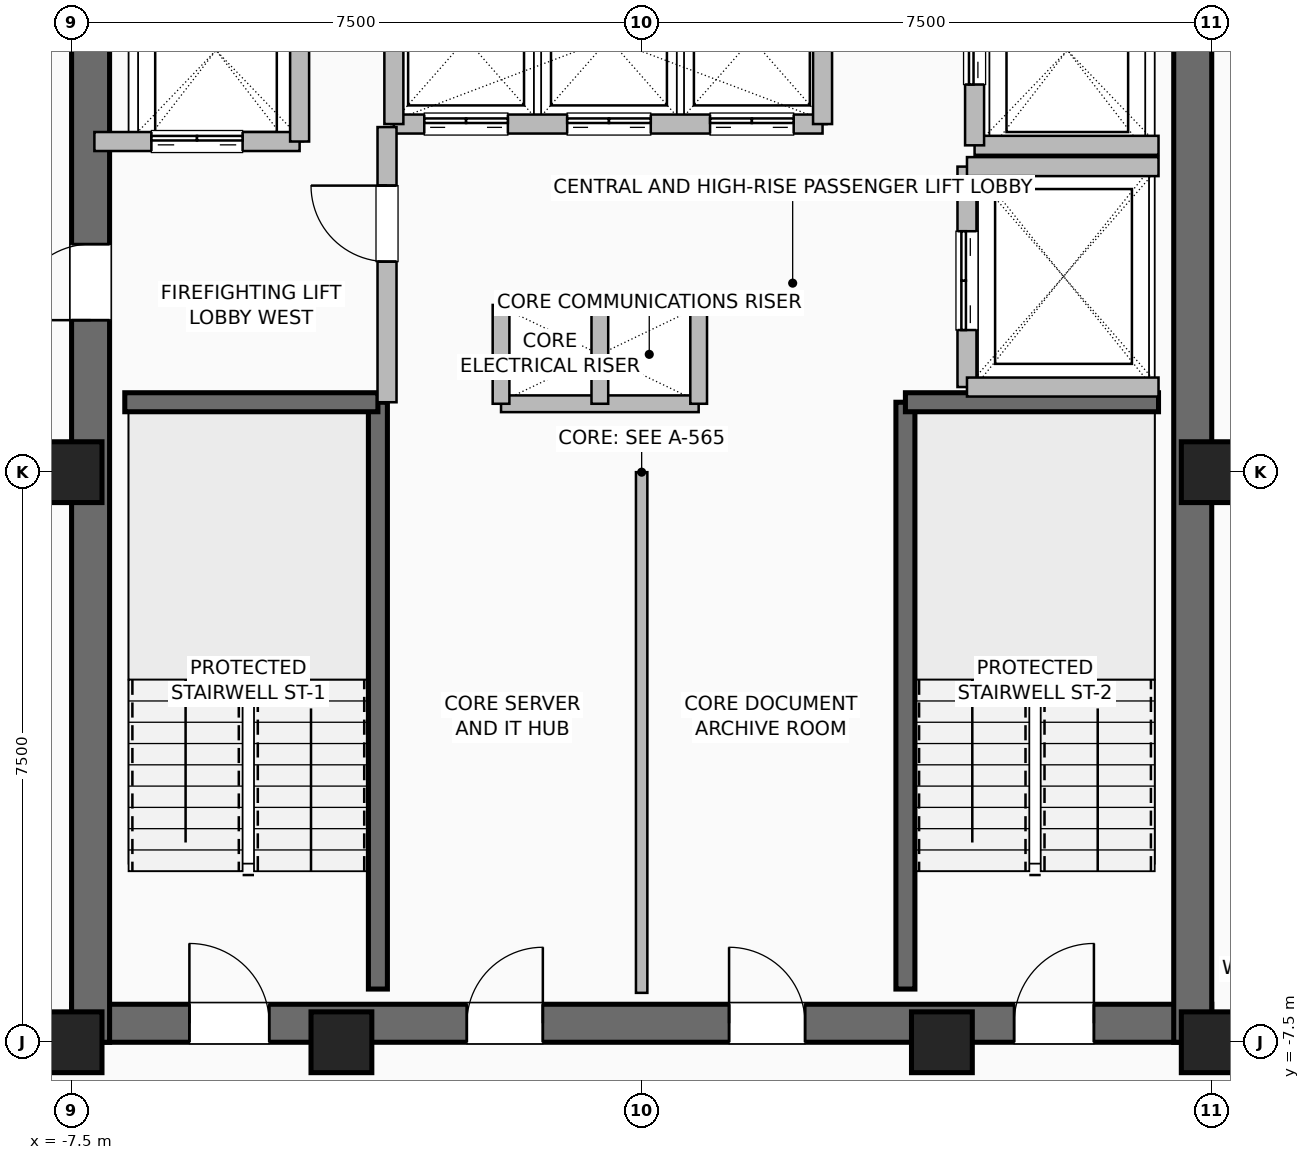
"""IFC4 building model, lengths in metres.
Left out: names, types, materials, properties, quantities, classifications, styles, units other than length and angle.
Written with IfcOpenShell. Run it as: python <this file> out.ifc"""

import sys

from ifc_helpers import new_model, si_unit, direction, frame, frame_2d, origin, origin_2d, place, context, subcontext, project, spatial, rectangle, hollow_rectangle, extrude, element, fill, save


model = new_model("IFC4")
c1 = context("Model", 3, precision=1e-05, world=origin(), true_north=direction((0.0, 1.0)))
c2 = subcontext(c1, "Body", "Model", "MODEL_VIEW")
j1 = project(units=[si_unit("LENGTHUNIT", "METRE"), si_unit("PLANEANGLEUNIT", "RADIAN")], contexts=[c1])
p1 = place(None, origin())
s1 = spatial("IfcSite", under=j1, at=p1, CompositionType="ELEMENT")
p2 = place(p1, origin())
s2 = spatial("IfcBuilding", under=s1, at=p2, CompositionType="ELEMENT")
p3 = place(p2, frame((0.0, 0.0, 261.2)))
s3 = spatial("IfcBuildingStorey", under=s2, at=p3, CompositionType="ELEMENT", Elevation=261.2)
for number, where, z_axis, x_axis in (
    (1, (-7.5, -7.5, 0.0), (0.0, 0.0, 1.0), (1.0, 0.0, 0.0)),
    (2, (-3.95, -7.5, 0.0), (0.0, 0.0, 1.0), (1.0, 0.0, 0.0)),
    (3, (3.95, -7.5, 0.0), (0.0, 0.0, 1.0), (1.0, 0.0, 0.0)),
    (4, (7.5, -7.5, 0.0), (0.0, 0.0, 1.0), (1.0, 0.0, 0.0)),
    (5, (7.5, 0.0, 0.0), (0.0, 0.0, 1.0), (1.0, 0.0, 0.0)),
    (6, (-7.5, 0.0, 0.0), (0.0, 0.0, 1.0), (1.0, 0.0, 0.0)),
):
    element("IfcColumn", number, at=place(p3, frame(where, z_axis=z_axis, x_axis=x_axis)), inside=s3, PredefinedType="COLUMN", context=c2, shape_type="SweptSolid", body=[
        extrude(hollow_rectangle(XDim=0.8, YDim=0.8, WallThickness=0.04, at=origin_2d()), origin(), (0.0, 0.0, 1.0), 3.6),
    ])
p4 = place(p3, frame((-7.5, -7.25, 0.0), z_axis=(0.0, 0.0, 1.0), x_axis=(1.0, 0.0, 0.0)))
e7 = element("IfcWall", 7, at=p4, inside=s3, PredefinedType="SHEAR", context=c2, shape_type="SweptSolid", body=[
    extrude(rectangle(XDim=15.0, YDim=0.5, at=frame_2d((7.5, 0.0))), origin(), (0.0, 0.0, 1.0), 3.36),
])
p5 = place(p4, frame((1.55, 0.0, 0.0)))
e8 = element("IfcOpeningElement", 8, at=p5, cuts=e7, PredefinedType="OPENING", context=c2, shape_type="SweptSolid", body=[
    extrude(rectangle(XDim=1.05, YDim=2.08, at=frame_2d((0.525, 1.04))), frame((0.0, 0.26, 0.0), z_axis=(0.0, -1.0, 0.0), x_axis=(1.0, 0.0, 0.0)), (0.0, 0.0, 1.0), 0.52),
])
p6 = place(p4, frame((12.4, 0.0, 0.0)))
e9 = element("IfcOpeningElement", 9, at=p6, cuts=e7, PredefinedType="OPENING", context=c2, shape_type="SweptSolid", body=[
    extrude(rectangle(XDim=1.05, YDim=2.08, at=frame_2d((0.525, 1.04))), frame((0.0, 0.26, 0.0), z_axis=(0.0, -1.0, 0.0), x_axis=(1.0, 0.0, 0.0)), (0.0, 0.0, 1.0), 0.52),
])
p7 = place(p4, frame((5.2, 0.0, 0.0)))
e10 = element("IfcOpeningElement", 10, at=p7, cuts=e7, PredefinedType="OPENING", context=c2, shape_type="SweptSolid", body=[
    extrude(rectangle(XDim=1.0, YDim=2.08, at=frame_2d((0.5, 1.04))), frame((0.0, 0.26, 0.0), z_axis=(0.0, -1.0, 0.0), x_axis=(1.0, 0.0, 0.0)), (0.0, 0.0, 1.0), 0.52),
])
p8 = place(p4, frame((8.65, 0.0, 0.0)))
e11 = element("IfcOpeningElement", 11, at=p8, cuts=e7, PredefinedType="OPENING", context=c2, shape_type="SweptSolid", body=[
    extrude(rectangle(XDim=1.0, YDim=2.08, at=frame_2d((0.5, 1.04))), frame((0.0, 0.26, 0.0), z_axis=(0.0, -1.0, 0.0), x_axis=(1.0, 0.0, 0.0)), (0.0, 0.0, 1.0), 0.52),
])
p9 = place(p3, frame((-7.25, -7.5, 0.0), z_axis=(0.0, 0.0, 1.0), x_axis=(0.0, 1.0, 0.0)))
e12 = element("IfcWall", 12, at=p9, inside=s3, PredefinedType="SHEAR", context=c2, shape_type="SweptSolid", body=[
    extrude(rectangle(XDim=15.0, YDim=0.5, at=frame_2d((7.5, 0.0))), origin(), (0.0, 0.0, 1.0), 3.36),
])
p10 = place(p9, frame((9.5, 0.0, 0.0)))
e13 = element("IfcOpeningElement", 13, at=p10, cuts=e12, PredefinedType="OPENING", context=c2, shape_type="SweptSolid", body=[
    extrude(rectangle(XDim=1.0, YDim=2.08, at=frame_2d((0.5, 1.04))), frame((0.0, 0.26, 0.0), z_axis=(0.0, -1.0, 0.0), x_axis=(1.0, 0.0, 0.0)), (0.0, 0.0, 1.0), 0.52),
])
p11 = place(p3, frame((7.25, -7.5, 0.0), z_axis=(0.0, 0.0, 1.0), x_axis=(0.0, 1.0, 0.0)))
e14 = element("IfcWall", 14, at=p11, inside=s3, PredefinedType="SHEAR", context=c2, shape_type="SweptSolid", body=[
    extrude(rectangle(XDim=15.0, YDim=0.5, at=frame_2d((7.5, 0.0))), origin(), (0.0, 0.0, 1.0), 3.36),
])
p12 = place(p3, frame((-3.47, -6.8, 0.0), z_axis=(0.0, 0.0, 1.0), x_axis=(0.0, 1.0, 0.0)))
e15 = element("IfcWall", 15, at=p12, inside=s3, PredefinedType="SHEAR", context=c2, shape_type="SweptSolid", body=[
    extrude(rectangle(XDim=7.72, YDim=0.25, at=frame_2d((3.86, 0.0))), origin(), (0.0, 0.0, 1.0), 3.36),
])
p13 = place(p3, frame((-6.8, 0.92, 0.0), z_axis=(0.0, 0.0, 1.0), x_axis=(1.0, 0.0, 0.0)))
e16 = element("IfcWall", 16, at=p13, inside=s3, PredefinedType="SHEAR", context=c2, shape_type="SweptSolid", body=[
    extrude(rectangle(XDim=3.33, YDim=0.25, at=frame_2d((1.665, 0.0))), origin(), (0.0, 0.0, 1.0), 3.36),
])
p14 = place(p3, frame((3.47, -6.8, 0.0), z_axis=(0.0, 0.0, 1.0), x_axis=(0.0, 1.0, 0.0)))
e17 = element("IfcWall", 17, at=p14, inside=s3, PredefinedType="SHEAR", context=c2, shape_type="SweptSolid", body=[
    extrude(rectangle(XDim=7.72, YDim=0.25, at=frame_2d((3.86, 0.0))), origin(), (0.0, 0.0, 1.0), 3.36),
])
p15 = place(p3, frame((3.47, 0.92, 0.0), z_axis=(0.0, 0.0, 1.0), x_axis=(1.0, 0.0, 0.0)))
e18 = element("IfcWall", 18, at=p15, inside=s3, PredefinedType="SHEAR", context=c2, shape_type="SweptSolid", body=[
    extrude(rectangle(XDim=3.33, YDim=0.25, at=frame_2d((1.665, 0.0))), origin(), (0.0, 0.0, 1.0), 3.36),
])
for number, where, z_axis, x_axis in (
    (19, (-1.85, 2.2, 0.0), (0.0, 0.0, 1.0), (1.0, 0.0, 0.0)),
    (20, (-1.85, 0.9, 0.0), (0.0, 0.0, 1.0), (1.0, 0.0, 0.0)),
):
    element("IfcWall", number, at=place(p3, frame(where, z_axis=z_axis, x_axis=x_axis)), inside=s3, PredefinedType="PARTITIONING", context=c2, shape_type="SweptSolid", body=[
        extrude(rectangle(XDim=2.6, YDim=0.22, at=frame_2d((1.3, 0.0))), origin(), (0.0, 0.0, 1.0), 3.36),
    ])
for number, where, z_axis, x_axis in (
    (21, (-0.55, 0.9, 0.0), (0.0, 0.0, 1.0), (0.0, 1.0, 0.0)),
    (22, (0.75, 0.9, 0.0), (0.0, 0.0, 1.0), (0.0, 1.0, 0.0)),
    (23, (-1.85, 0.9, 0.0), (0.0, 0.0, 1.0), (0.0, 1.0, 0.0)),
):
    element("IfcWall", number, at=place(p3, frame(where, z_axis=z_axis, x_axis=x_axis)), inside=s3, PredefinedType="PARTITIONING", context=c2, shape_type="SweptSolid", body=[
        extrude(rectangle(XDim=1.3, YDim=0.22, at=frame_2d((0.65, 0.0))), origin(), (0.0, 0.0, 1.0), 3.36),
    ])
p16 = place(p3, frame((-3.26, 4.58, 0.0), z_axis=(0.0, 0.0, 1.0), x_axis=(1.0, 0.0, 0.0)))
e24 = element("IfcWall", 24, at=p16, inside=s3, PredefinedType="SHEAR", context=c2, shape_type="SweptSolid", body=[
    extrude(rectangle(XDim=5.64, YDim=0.25, at=frame_2d((2.82, 0.0))), origin(), (0.0, 0.0, 1.0), 3.36),
])
p17 = place(p16, frame((0.4, 0.0, 0.0)))
e25 = element("IfcOpeningElement", 25, at=p17, cuts=e24, PredefinedType="OPENING", context=c2, shape_type="SweptSolid", body=[
    extrude(rectangle(XDim=1.1, YDim=2.2, at=frame_2d((0.55, 1.1))), frame((0.0, 0.135, 0.0), z_axis=(0.0, -1.0, 0.0), x_axis=(1.0, 0.0, 0.0)), (0.0, 0.0, 1.0), 0.27),
])
p18 = place(p16, frame((2.28, 0.0, 0.0)))
e26 = element("IfcOpeningElement", 26, at=p18, cuts=e24, PredefinedType="OPENING", context=c2, shape_type="SweptSolid", body=[
    extrude(rectangle(XDim=1.1, YDim=2.2, at=frame_2d((0.55, 1.1))), frame((0.0, 0.135, 0.0), z_axis=(0.0, -1.0, 0.0), x_axis=(1.0, 0.0, 0.0)), (0.0, 0.0, 1.0), 0.27),
])
p19 = place(p16, frame((4.16, 0.0, 0.0)))
e27 = element("IfcOpeningElement", 27, at=p19, cuts=e24, PredefinedType="OPENING", context=c2, shape_type="SweptSolid", body=[
    extrude(rectangle(XDim=1.1, YDim=2.2, at=frame_2d((0.55, 1.1))), frame((0.0, 0.135, 0.0), z_axis=(0.0, -1.0, 0.0), x_axis=(1.0, 0.0, 0.0)), (0.0, 0.0, 1.0), 0.27),
])
for number, where, z_axis, x_axis in (
    (28, (-3.26, 4.58, 0.0), (0.0, 0.0, 1.0), (0.0, 1.0, 0.0)),
    (29, (2.38, 4.58, 0.0), (0.0, 0.0, 1.0), (0.0, 1.0, 0.0)),
):
    element("IfcWall", number, at=place(p3, frame(where, z_axis=z_axis, x_axis=x_axis)), inside=s3, PredefinedType="SHEAR", context=c2, shape_type="SweptSolid", body=[
        extrude(rectangle(XDim=2.22, YDim=0.25, at=frame_2d((1.11, 0.0))), origin(), (0.0, 0.0, 1.0), 3.36),
    ])
p20 = place(p3, frame((-7.2, 4.35, 0.0), z_axis=(0.0, 0.0, 1.0), x_axis=(1.0, 0.0, 0.0)))
e30 = element("IfcWall", 30, at=p20, inside=s3, PredefinedType="SHEAR", context=c2, shape_type="SweptSolid", body=[
    extrude(rectangle(XDim=2.7, YDim=0.25, at=frame_2d((1.35, 0.0))), origin(), (0.0, 0.0, 1.0), 3.36),
])
p21 = place(p20, frame((0.75, 0.0, 0.0)))
e31 = element("IfcOpeningElement", 31, at=p21, cuts=e30, PredefinedType="OPENING", context=c2, shape_type="SweptSolid", body=[
    extrude(rectangle(XDim=1.2, YDim=2.2, at=frame_2d((0.6, 1.1))), frame((0.0, 0.135, 0.0), z_axis=(0.0, -1.0, 0.0), x_axis=(1.0, 0.0, 0.0)), (0.0, 0.0, 1.0), 0.27),
])
p22 = place(p3, frame((-4.5, 4.35, 0.0), z_axis=(0.0, 0.0, 1.0), x_axis=(0.0, 1.0, 0.0)))
e32 = element("IfcWall", 32, at=p22, inside=s3, PredefinedType="SHEAR", context=c2, shape_type="SweptSolid", body=[
    extrude(rectangle(XDim=2.85, YDim=0.25, at=frame_2d((1.425, 0.0))), origin(), (0.0, 0.0, 1.0), 3.36),
])
p23 = place(p3, frame((4.38, 4.3, 0.0), z_axis=(0.0, 0.0, 1.0), x_axis=(1.0, 0.0, 0.0)))
e33 = element("IfcWall", 33, at=p23, inside=s3, PredefinedType="SHEAR", context=c2, shape_type="SweptSolid", body=[
    extrude(rectangle(XDim=2.42, YDim=0.25, at=frame_2d((1.21, 0.0))), origin(), (0.0, 0.0, 1.0), 3.36),
])
p24 = place(p3, frame((4.38, 4.3, 0.0), z_axis=(0.0, 0.0, 1.0), x_axis=(0.0, 1.0, 0.0)))
e34 = element("IfcWall", 34, at=p24, inside=s3, PredefinedType="SHEAR", context=c2, shape_type="SweptSolid", body=[
    extrude(rectangle(XDim=2.5, YDim=0.25, at=frame_2d((1.25, 0.0))), origin(), (0.0, 0.0, 1.0), 3.36),
])
p25 = place(p24, frame((0.8, 0.0, 0.0)))
e35 = element("IfcOpeningElement", 35, at=p25, cuts=e34, PredefinedType="OPENING", context=c2, shape_type="SweptSolid", body=[
    extrude(rectangle(XDim=1.2, YDim=2.2, at=frame_2d((0.6, 1.1))), frame((0.0, 0.135, 0.0), z_axis=(0.0, -1.0, 0.0), x_axis=(1.0, 0.0, 0.0)), (0.0, 0.0, 1.0), 0.27),
])
p26 = place(p3, frame((4.28, 1.12, 0.0), z_axis=(0.0, 0.0, 1.0), x_axis=(0.0, 1.0, 0.0)))
e36 = element("IfcWall", 36, at=p26, inside=s3, PredefinedType="SHEAR", context=c2, shape_type="SweptSolid", body=[
    extrude(rectangle(XDim=2.9, YDim=0.25, at=frame_2d((1.45, 0.0))), origin(), (0.0, 0.0, 1.0), 3.36),
])
p27 = place(p26, frame((0.75, 0.0, 0.0)))
e37 = element("IfcOpeningElement", 37, at=p27, cuts=e36, PredefinedType="OPENING", context=c2, shape_type="SweptSolid", body=[
    extrude(rectangle(XDim=1.3, YDim=2.3, at=frame_2d((0.65, 1.15))), frame((0.0, 0.135, 0.0), z_axis=(0.0, -1.0, 0.0), x_axis=(1.0, 0.0, 0.0)), (0.0, 0.0, 1.0), 0.27),
])
for number, where, z_axis, x_axis in (
    (38, (4.28, 1.12, 0.0), (0.0, 0.0, 1.0), (1.0, 0.0, 0.0)),
    (39, (4.28, 4.02, 0.0), (0.0, 0.0, 1.0), (1.0, 0.0, 0.0)),
):
    element("IfcWall", number, at=place(p3, frame(where, z_axis=z_axis, x_axis=x_axis)), inside=s3, PredefinedType="SHEAR", context=c2, shape_type="SweptSolid", body=[
        extrude(rectangle(XDim=2.52, YDim=0.25, at=frame_2d((1.26, 0.0))), origin(), (0.0, 0.0, 1.0), 3.36),
    ])
p28 = place(p3, frame((-3.35, 0.92, 0.0), z_axis=(0.0, 0.0, 1.0), x_axis=(0.0, 1.0, 0.0)))
e40 = element("IfcWall", 40, at=p28, inside=s3, PredefinedType="SHEAR", context=c2, shape_type="SweptSolid", body=[
    extrude(rectangle(XDim=3.62, YDim=0.25, at=frame_2d((1.81, 0.0))), origin(), (0.0, 0.0, 1.0), 3.36),
])
p29 = place(p28, frame((1.85, 0.0, 0.0)))
e41 = element("IfcOpeningElement", 41, at=p29, cuts=e40, PredefinedType="OPENING", context=c2, shape_type="SweptSolid", body=[
    extrude(rectangle(XDim=1.0, YDim=2.08, at=frame_2d((0.5, 1.04))), frame((0.0, 0.135, 0.0), z_axis=(0.0, -1.0, 0.0), x_axis=(1.0, 0.0, 0.0)), (0.0, 0.0, 1.0), 0.27),
])
p30 = place(p3, frame((0.0, -6.85, 0.0), z_axis=(0.0, 0.0, 1.0), x_axis=(0.0, 1.0, 0.0)))
e42 = element("IfcWall", 42, at=p30, inside=s3, PredefinedType="PARTITIONING", context=c2, shape_type="SweptSolid", body=[
    extrude(rectangle(XDim=6.85, YDim=0.15, at=frame_2d((3.425, 0.0))), origin(), (0.0, 0.0, 1.0), 3.36),
])
p31 = place(p3, frame((7.45, -7.48, 0.0), z_axis=(0.0, 0.0, 1.0), x_axis=(1.0, 0.0, 0.0)))
e43 = element("IfcWall", 43, at=p31, inside=s3, PredefinedType="PARTITIONING", context=c2, shape_type="SweptSolid", body=[
    extrude(rectangle(XDim=0.95, YDim=0.15, at=frame_2d((0.475, 0.0))), origin(), (0.0, 0.0, 1.0), 3.36),
])
p32 = place(p5, origin())
e44 = element("IfcDoor", 44, at=p32, inside=s3, OperationType="SINGLE_SWING_LEFT", PredefinedType="DOOR", context=c2, shape_type="SweptSolid", body=[
    extrude(rectangle(XDim=1.05, YDim=2.08, at=frame_2d((0.525, 1.04))), frame((0.0, 0.025, 0.0), z_axis=(0.0, -1.0, 0.0), x_axis=(1.0, 0.0, 0.0)), (0.0, 0.0, 1.0), 0.05),
])
fill(e8, e44)
p33 = place(p6, origin())
e45 = element("IfcDoor", 45, at=p33, inside=s3, OperationType="SINGLE_SWING_RIGHT", PredefinedType="DOOR", context=c2, shape_type="SweptSolid", body=[
    extrude(rectangle(XDim=1.05, YDim=2.08, at=frame_2d((0.525, 1.04))), frame((0.0, 0.025, 0.0), z_axis=(0.0, -1.0, 0.0), x_axis=(1.0, 0.0, 0.0)), (0.0, 0.0, 1.0), 0.05),
])
fill(e9, e45)
p34 = place(p10, origin())
e46 = element("IfcDoor", 46, at=p34, inside=s3, OperationType="SINGLE_SWING_LEFT", PredefinedType="DOOR", context=c2, shape_type="SweptSolid", body=[
    extrude(rectangle(XDim=1.0, YDim=2.08, at=frame_2d((0.5, 1.04))), frame((0.0, 0.025, 0.0), z_axis=(0.0, -1.0, 0.0), x_axis=(1.0, 0.0, 0.0)), (0.0, 0.0, 1.0), 0.05),
])
fill(e13, e46)
p35 = place(p7, origin())
e47 = element("IfcDoor", 47, at=p35, inside=s3, OperationType="SINGLE_SWING_RIGHT", PredefinedType="DOOR", context=c2, shape_type="SweptSolid", body=[
    extrude(rectangle(XDim=1.0, YDim=2.08, at=frame_2d((0.5, 1.04))), frame((0.0, 0.025, 0.0), z_axis=(0.0, -1.0, 0.0), x_axis=(1.0, 0.0, 0.0)), (0.0, 0.0, 1.0), 0.05),
])
fill(e10, e47)
p36 = place(p8, origin())
e48 = element("IfcDoor", 48, at=p36, inside=s3, OperationType="SINGLE_SWING_LEFT", PredefinedType="DOOR", context=c2, shape_type="SweptSolid", body=[
    extrude(rectangle(XDim=1.0, YDim=2.08, at=frame_2d((0.5, 1.04))), frame((0.0, 0.025, 0.0), z_axis=(0.0, -1.0, 0.0), x_axis=(1.0, 0.0, 0.0)), (0.0, 0.0, 1.0), 0.05),
])
fill(e11, e48)
p37 = place(p17, origin())
e49 = element("IfcDoor", 49, at=p37, inside=s3, OperationType="DOUBLE_DOOR_SLIDING", PredefinedType="DOOR", context=c2, shape_type="SweptSolid", body=[
    extrude(rectangle(XDim=1.1, YDim=2.2, at=frame_2d((0.55, 1.1))), frame((0.0, 0.025, 0.0), z_axis=(0.0, -1.0, 0.0), x_axis=(1.0, 0.0, 0.0)), (0.0, 0.0, 1.0), 0.05),
])
fill(e25, e49)
p38 = place(p18, origin())
e50 = element("IfcDoor", 50, at=p38, inside=s3, OperationType="DOUBLE_DOOR_SLIDING", PredefinedType="DOOR", context=c2, shape_type="SweptSolid", body=[
    extrude(rectangle(XDim=1.1, YDim=2.2, at=frame_2d((0.55, 1.1))), frame((0.0, 0.025, 0.0), z_axis=(0.0, -1.0, 0.0), x_axis=(1.0, 0.0, 0.0)), (0.0, 0.0, 1.0), 0.05),
])
fill(e26, e50)
p39 = place(p19, origin())
e51 = element("IfcDoor", 51, at=p39, inside=s3, OperationType="DOUBLE_DOOR_SLIDING", PredefinedType="DOOR", context=c2, shape_type="SweptSolid", body=[
    extrude(rectangle(XDim=1.1, YDim=2.2, at=frame_2d((0.55, 1.1))), frame((0.0, 0.025, 0.0), z_axis=(0.0, -1.0, 0.0), x_axis=(1.0, 0.0, 0.0)), (0.0, 0.0, 1.0), 0.05),
])
fill(e27, e51)
p40 = place(p21, origin())
e52 = element("IfcDoor", 52, at=p40, inside=s3, OperationType="DOUBLE_DOOR_SLIDING", PredefinedType="DOOR", context=c2, shape_type="SweptSolid", body=[
    extrude(rectangle(XDim=1.2, YDim=2.2, at=frame_2d((0.6, 1.1))), frame((0.0, 0.025, 0.0), z_axis=(0.0, -1.0, 0.0), x_axis=(1.0, 0.0, 0.0)), (0.0, 0.0, 1.0), 0.05),
])
fill(e31, e52)
p41 = place(p25, origin())
e53 = element("IfcDoor", 53, at=p41, inside=s3, OperationType="DOUBLE_DOOR_SLIDING", PredefinedType="DOOR", context=c2, shape_type="SweptSolid", body=[
    extrude(rectangle(XDim=1.2, YDim=2.2, at=frame_2d((0.6, 1.1))), frame((0.0, 0.025, 0.0), z_axis=(0.0, -1.0, 0.0), x_axis=(1.0, 0.0, 0.0)), (0.0, 0.0, 1.0), 0.05),
])
fill(e35, e53)
p42 = place(p27, origin())
e54 = element("IfcDoor", 54, at=p42, inside=s3, OperationType="DOUBLE_DOOR_SLIDING", PredefinedType="DOOR", context=c2, shape_type="SweptSolid", body=[
    extrude(rectangle(XDim=1.3, YDim=2.3, at=frame_2d((0.65, 1.15))), frame((0.0, 0.025, 0.0), z_axis=(0.0, -1.0, 0.0), x_axis=(1.0, 0.0, 0.0)), (0.0, 0.0, 1.0), 0.05),
])
fill(e37, e54)
p43 = place(p29, origin())
e55 = element("IfcDoor", 55, at=p43, inside=s3, OperationType="SINGLE_SWING_RIGHT", PredefinedType="DOOR", context=c2, shape_type="SweptSolid", body=[
    extrude(rectangle(XDim=1.0, YDim=2.08, at=frame_2d((0.5, 1.04))), frame((0.0, 0.025, 0.0), z_axis=(0.0, -1.0, 0.0), x_axis=(1.0, 0.0, 0.0)), (0.0, 0.0, 1.0), 0.05),
])
fill(e41, e55)
save(model, sys.argv[1])
